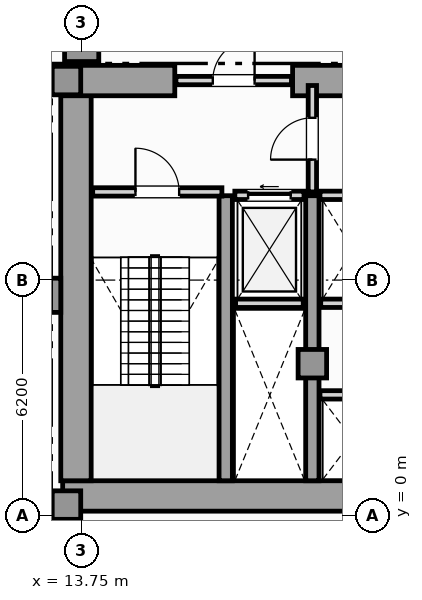
"""IFC4 building model, lengths in metres.
Left out: names, types, materials, properties, quantities, classifications, styles, units other than length and angle.
Written with IfcOpenShell. Run it as: python <this file> out.ifc"""

import sys

from ifc_helpers import new_model, si_unit, direction, frame, frame_2d, origin, origin_2d, place, context, subcontext, project, spatial, rectangle, extrude, element, fill, save


model = new_model("IFC4")
c1 = context("Model", 3, precision=1e-05, world=origin(), true_north=direction((0.0, 1.0)))
c2 = subcontext(c1, "Body", "Model", "MODEL_VIEW")
j1 = project(units=[si_unit("LENGTHUNIT", "METRE"), si_unit("PLANEANGLEUNIT", "RADIAN")], contexts=[c1])
p1 = place(None, origin())
s1 = spatial("IfcSite", under=j1, at=p1, CompositionType="ELEMENT")
p2 = place(p1, origin())
s2 = spatial("IfcBuilding", under=s1, at=p2, CompositionType="ELEMENT")
p3 = place(p2, frame((0.0, 0.0, 15.0)))
s3 = spatial("IfcBuildingStorey", under=s2, at=p3, CompositionType="ELEMENT", Elevation=15.0)
p4 = place(p3, frame((13.25, 0.52, 0.0), z_axis=(0.0, 0.0, 1.0), x_axis=(1.0, 0.0, 0.0)))
e1 = element("IfcWall", 1, at=p4, inside=s3, PredefinedType="SHEAR", context=c2, shape_type="SweptSolid", body=[
    extrude(rectangle(XDim=31.0, YDim=0.8, at=frame_2d((15.5, 0.0))), origin(), (0.0, 0.0, 1.0), 4.5),
])
p5 = place(p3, frame((13.6, 0.92, 0.0), z_axis=(0.0, 0.0, 1.0), x_axis=(0.0, 1.0, 0.0)))
e2 = element("IfcWall", 2, at=p5, inside=s3, PredefinedType="SHEAR", context=c2, shape_type="SweptSolid", body=[
    extrude(rectangle(XDim=10.53, YDim=0.8, at=frame_2d((5.265, 0.0))), origin(), (0.0, 0.0, 1.0), 4.5),
])
p6 = place(p3, frame((13.25, 11.45, 0.0), z_axis=(0.0, 0.0, 1.0), x_axis=(1.0, 0.0, 0.0)))
e3 = element("IfcWall", 3, at=p6, inside=s3, PredefinedType="SHEAR", context=c2, shape_type="SweptSolid", body=[
    extrude(rectangle(XDim=2.95, YDim=0.8, at=frame_2d((1.475, 0.0))), origin(), (0.0, 0.0, 1.0), 4.5),
])
p7 = place(p3, frame((19.3, 11.45, 0.0), z_axis=(0.0, 0.0, 1.0), x_axis=(1.0, 0.0, 0.0)))
e4 = element("IfcWall", 4, at=p7, inside=s3, PredefinedType="SHEAR", context=c2, shape_type="SweptSolid", body=[
    extrude(rectangle(XDim=7.3, YDim=0.8, at=frame_2d((3.65, 0.0))), origin(), (0.0, 0.0, 1.0), 4.5),
])
for number, where, z_axis, x_axis in (
    (5, (17.54, 0.92, 0.0), (0.0, 0.0, 1.0), (0.0, 1.0, 0.0)),
    (6, (19.82, 0.92, 0.0), (0.0, 0.0, 1.0), (0.0, 1.0, 0.0)),
):
    element("IfcWall", number, at=place(p3, frame(where, z_axis=z_axis, x_axis=x_axis)), inside=s3, PredefinedType="SHEAR", context=c2, shape_type="SweptSolid", body=[
        extrude(rectangle(XDim=7.5, YDim=0.35, at=frame_2d((3.75, 0.0))), origin(), (0.0, 0.0, 1.0), 4.5),
    ])
p8 = place(p3, frame((12.9, 5.8, 0.0), z_axis=(0.0, 0.0, 1.0), x_axis=(1.0, 0.0, 0.0)))
e7 = element("IfcColumn", 7, at=p8, inside=s3, PredefinedType="PILASTER", context=c2, shape_type="SweptSolid", body=[
    extrude(rectangle(XDim=0.6, YDim=0.9, at=origin_2d()), origin(), (0.0, 0.0, 1.0), 4.8),
])
for number, where, z_axis, x_axis in (
    (8, (13.35, 0.28, 0.0), (0.0, 0.0, 1.0), (1.0, 0.0, 0.0)),
    (9, (13.35, 11.45, 0.0), (0.0, 0.0, 1.0), (1.0, 0.0, 0.0)),
    (10, (19.82, 4.0, 0.0), (0.0, 0.0, 1.0), (1.0, 0.0, 0.0)),
):
    element("IfcColumn", number, at=place(p3, frame(where, z_axis=z_axis, x_axis=x_axis)), inside=s3, PredefinedType="COLUMN", context=c2, shape_type="SweptSolid", body=[
        extrude(rectangle(XDim=0.75, YDim=0.75, at=origin_2d()), origin(), (0.0, 0.0, 1.0), 4.8),
    ])
p9 = place(p3, frame((13.75, 12.4, 0.0), z_axis=(0.0, 0.0, 1.0), x_axis=(1.0, 0.0, 0.0)))
e11 = element("IfcColumn", 11, at=p9, inside=s3, PredefinedType="COLUMN", context=c2, shape_type="SweptSolid", body=[
    extrude(rectangle(XDim=0.9, YDim=0.9, at=origin_2d()), origin(), (0.0, 0.0, 1.0), 4.8),
])
p10 = place(p3, frame((17.8, 5.59, 0.0), z_axis=(0.0, 0.0, 1.0), x_axis=(1.0, 0.0, 0.0)))
e12 = element("IfcWall", 12, at=p10, inside=s3, PredefinedType="SOLIDWALL", context=c2, shape_type="SweptSolid", body=[
    extrude(rectangle(XDim=1.78, YDim=0.22, at=frame_2d((0.89, 0.0))), origin(), (0.0, 0.0, 1.0), 4.5),
])
p11 = place(p3, frame((17.78, 8.43, 0.0), z_axis=(0.0, 0.0, 1.0), x_axis=(1.0, 0.0, 0.0)))
e13 = element("IfcWall", 13, at=p11, inside=s3, PredefinedType="SOLIDWALL", context=c2, shape_type="SweptSolid", body=[
    extrude(rectangle(XDim=1.82, YDim=0.22, at=frame_2d((0.91, 0.0))), origin(), (0.0, 0.0, 1.0), 4.5),
])
p12 = place(p11, frame((0.35, 0.0, 0.0)))
e14 = element("IfcOpeningElement", 14, at=p12, cuts=e13, PredefinedType="OPENING", context=c2, shape_type="SweptSolid", body=[
    extrude(rectangle(XDim=1.12, YDim=2.25, at=frame_2d((0.56, 1.125))), frame((0.0, 0.12, 0.0), z_axis=(0.0, -1.0, 0.0), x_axis=(1.0, 0.0, 0.0)), (0.0, 0.0, 1.0), 0.24),
])
p13 = place(p3, frame((20.02, 3.18, 0.0), z_axis=(0.0, 0.0, 1.0), x_axis=(1.0, 0.0, 0.0)))
e15 = element("IfcWall", 15, at=p13, inside=s3, PredefinedType="SOLIDWALL", context=c2, shape_type="SweptSolid", body=[
    extrude(rectangle(XDim=1.74, YDim=0.22, at=frame_2d((0.87, 0.0))), origin(), (0.0, 0.0, 1.0), 4.5),
])
p14 = place(p3, frame((20.04, 5.59, 0.0), z_axis=(0.0, 0.0, 1.0), x_axis=(1.0, 0.0, 0.0)))
e16 = element("IfcWall", 16, at=p14, inside=s3, PredefinedType="SOLIDWALL", context=c2, shape_type="SweptSolid", body=[
    extrude(rectangle(XDim=1.7, YDim=0.22, at=frame_2d((0.85, 0.0))), origin(), (0.0, 0.0, 1.0), 4.5),
])
p15 = place(p3, frame((20.02, 8.43, 0.0), z_axis=(0.0, 0.0, 1.0), x_axis=(1.0, 0.0, 0.0)))
e17 = element("IfcWall", 17, at=p15, inside=s3, PredefinedType="SOLIDWALL", context=c2, shape_type="SweptSolid", body=[
    extrude(rectangle(XDim=1.74, YDim=0.22, at=frame_2d((0.87, 0.0))), origin(), (0.0, 0.0, 1.0), 4.5),
])
p16 = place(p3, frame((14.04, 8.52, 0.0), z_axis=(0.0, 0.0, 1.0), x_axis=(1.0, 0.0, 0.0)))
e18 = element("IfcWall", 18, at=p16, inside=s3, PredefinedType="SOLIDWALL", context=c2, shape_type="SweptSolid", body=[
    extrude(rectangle(XDim=3.4, YDim=0.22, at=frame_2d((1.7, 0.0))), origin(), (0.0, 0.0, 1.0), 4.5),
])
p17 = place(p16, frame((1.125, 0.0, 0.0)))
e19 = element("IfcOpeningElement", 19, at=p17, cuts=e18, PredefinedType="OPENING", context=c2, shape_type="SweptSolid", body=[
    extrude(rectangle(XDim=1.15, YDim=2.2, at=frame_2d((0.575, 1.1))), frame((0.0, 0.12, 0.0), z_axis=(0.0, -1.0, 0.0), x_axis=(1.0, 0.0, 0.0)), (0.0, 0.0, 1.0), 0.24),
])
p18 = place(p3, frame((19.82, 8.52, 0.0), z_axis=(0.0, 0.0, 1.0), x_axis=(0.0, 1.0, 0.0)))
e20 = element("IfcWall", 20, at=p18, inside=s3, PredefinedType="SOLIDWALL", context=c2, shape_type="SweptSolid", body=[
    extrude(rectangle(XDim=2.8, YDim=0.22, at=frame_2d((1.4, 0.0))), origin(), (0.0, 0.0, 1.0), 3.956),
])
p19 = place(p18, frame((0.85, 0.0, 0.0)))
e21 = element("IfcOpeningElement", 21, at=p19, cuts=e20, PredefinedType="OPENING", context=c2, shape_type="SweptSolid", body=[
    extrude(rectangle(XDim=1.1, YDim=2.2, at=frame_2d((0.55, 1.1))), frame((0.0, 0.12, 0.0), z_axis=(0.0, -1.0, 0.0), x_axis=(1.0, 0.0, 0.0)), (0.0, 0.0, 1.0), 0.24),
])
p20 = place(p3, frame((16.23, 11.45, 0.0), z_axis=(0.0, 0.0, 1.0), x_axis=(1.0, 0.0, 0.0)))
e22 = element("IfcWall", 22, at=p20, inside=s3, PredefinedType="SOLIDWALL", context=c2, shape_type="SweptSolid", body=[
    extrude(rectangle(XDim=3.04, YDim=0.22, at=frame_2d((1.52, 0.0))), origin(), (0.0, 0.0, 1.0), 4.5),
])
p21 = place(p20, frame((0.97, 0.0, 0.0)))
e23 = element("IfcOpeningElement", 23, at=p21, cuts=e22, PredefinedType="OPENING", context=c2, shape_type="SweptSolid", body=[
    extrude(rectangle(XDim=1.1, YDim=2.2, at=frame_2d((0.55, 1.1))), frame((0.0, 0.12, 0.0), z_axis=(0.0, -1.0, 0.0), x_axis=(1.0, 0.0, 0.0)), (0.0, 0.0, 1.0), 0.24),
])
p22 = place(p12, origin())
e24 = element("IfcDoor", 24, at=p22, inside=s3, OperationType="SLIDING_TO_LEFT", PredefinedType="DOOR", context=c2, shape_type="SweptSolid", body=[
    extrude(rectangle(XDim=1.12, YDim=2.25, at=frame_2d((0.56, 1.125))), frame((0.0, 0.025, 0.0), z_axis=(0.0, -1.0, 0.0), x_axis=(1.0, 0.0, 0.0)), (0.0, 0.0, 1.0), 0.05),
])
fill(e14, e24)
p23 = place(p17, origin())
e25 = element("IfcDoor", 25, at=p23, inside=s3, OperationType="SINGLE_SWING_LEFT", PredefinedType="DOOR", context=c2, shape_type="SweptSolid", body=[
    extrude(rectangle(XDim=1.15, YDim=2.2, at=frame_2d((0.575, 1.1))), frame((0.0, 0.025, 0.0), z_axis=(0.0, -1.0, 0.0), x_axis=(1.0, 0.0, 0.0)), (0.0, 0.0, 1.0), 0.05),
])
fill(e19, e25)
p24 = place(p19, origin())
e26 = element("IfcDoor", 26, at=p24, inside=s3, OperationType="SINGLE_SWING_LEFT", PredefinedType="DOOR", context=c2, shape_type="SweptSolid", body=[
    extrude(rectangle(XDim=1.1, YDim=2.2, at=frame_2d((0.55, 1.1))), frame((0.0, 0.025, 0.0), z_axis=(0.0, -1.0, 0.0), x_axis=(1.0, 0.0, 0.0)), (0.0, 0.0, 1.0), 0.05),
])
fill(e21, e26)
p25 = place(p21, origin())
e27 = element("IfcDoor", 27, at=p25, inside=s3, OperationType="SINGLE_SWING_RIGHT", PredefinedType="DOOR", context=c2, shape_type="SweptSolid", body=[
    extrude(rectangle(XDim=1.1, YDim=2.2, at=frame_2d((0.55, 1.1))), frame((0.0, 0.025, 0.0), z_axis=(0.0, -1.0, 0.0), x_axis=(1.0, 0.0, 0.0)), (0.0, 0.0, 1.0), 0.05),
])
fill(e23, e27)
save(model, sys.argv[1])
